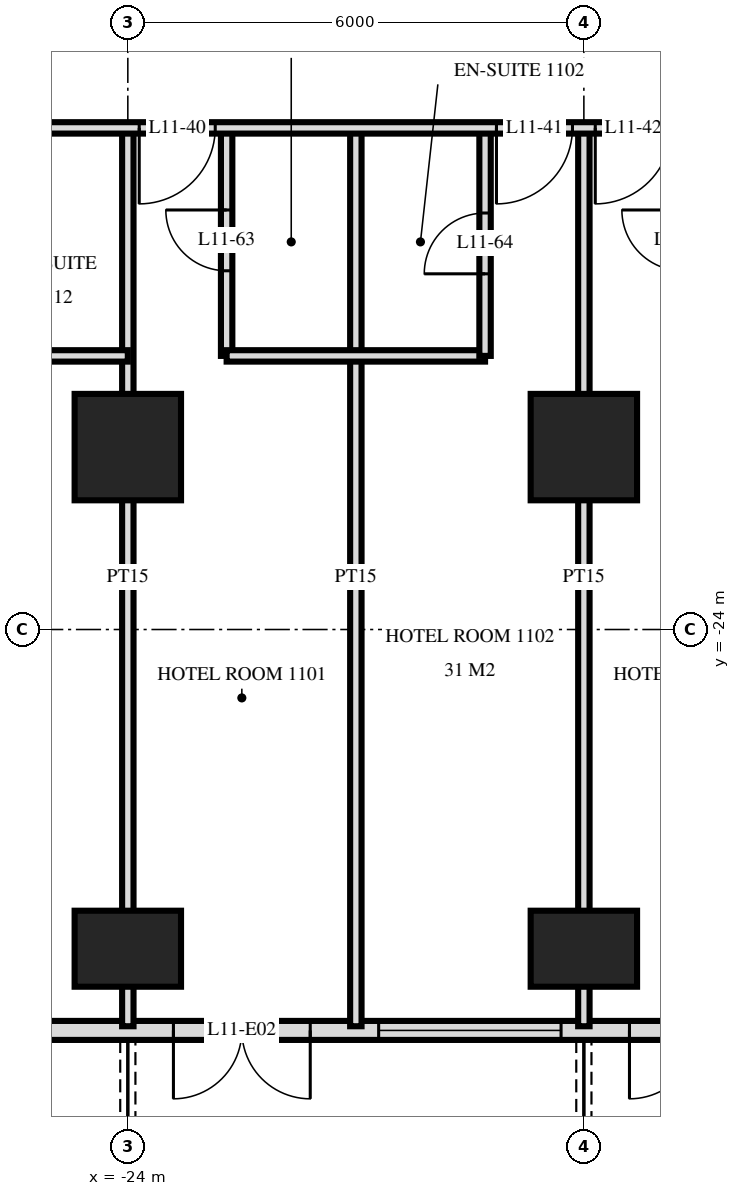
"""IFC4 building model, lengths in metres.
Left out: names, types, materials, properties, quantities, classifications, styles, units other than length and angle.
Written with IfcOpenShell. Run it as: python <this file> out.ifc"""

import sys

from ifc_helpers import new_model, si_unit, direction, frame, frame_2d, origin, origin_2d, place, context, subcontext, project, spatial, rectangle, extrude, element, fill, save


model = new_model("IFC4")
c1 = context("Model", 3, precision=1e-05, world=origin(), true_north=direction((0.0, 1.0)))
c2 = subcontext(c1, "Body", "Model", "MODEL_VIEW")
j1 = project(units=[si_unit("LENGTHUNIT", "METRE"), si_unit("PLANEANGLEUNIT", "RADIAN")], contexts=[c1])
p1 = place(None, origin())
s1 = spatial("IfcSite", under=j1, at=p1, CompositionType="ELEMENT")
p2 = place(p1, origin())
s2 = spatial("IfcBuilding", under=s1, at=p2, CompositionType="ELEMENT")
p3 = place(p2, frame((0.0, 0.0, 49.2)))
s3 = spatial("IfcBuildingStorey", under=s2, at=p3, CompositionType="ELEMENT", Elevation=49.2)
p4 = place(p3, frame((-24.0, -28.2, 0.0), z_axis=(0.0, 0.0, 1.0), x_axis=(1.0, 0.0, 0.0)))
e1 = element("IfcColumn", 1, at=p4, inside=s3, PredefinedType="COLUMN", context=c2, shape_type="SweptSolid", body=[
    extrude(rectangle(XDim=1.4, YDim=1.0, at=origin_2d()), origin(), (0.0, 0.0, 1.0), 3.6),
])
p5 = place(p3, frame((-24.0, -21.6, 0.0), z_axis=(0.0, 0.0, 1.0), x_axis=(1.0, 0.0, 0.0)))
e2 = element("IfcColumn", 2, at=p5, inside=s3, PredefinedType="COLUMN", context=c2, shape_type="SweptSolid", body=[
    extrude(rectangle(XDim=1.4, YDim=1.4, at=origin_2d()), origin(), (0.0, 0.0, 1.0), 3.6),
])
p6 = place(p3, frame((-18.0, -28.2, 0.0), z_axis=(0.0, 0.0, 1.0), x_axis=(1.0, 0.0, 0.0)))
e3 = element("IfcColumn", 3, at=p6, inside=s3, PredefinedType="COLUMN", context=c2, shape_type="SweptSolid", body=[
    extrude(rectangle(XDim=1.4, YDim=1.0, at=origin_2d()), origin(), (0.0, 0.0, 1.0), 3.6),
])
p7 = place(p3, frame((-18.0, -21.6, 0.0), z_axis=(0.0, 0.0, 1.0), x_axis=(1.0, 0.0, 0.0)))
e4 = element("IfcColumn", 4, at=p7, inside=s3, PredefinedType="COLUMN", context=c2, shape_type="SweptSolid", body=[
    extrude(rectangle(XDim=1.4, YDim=1.4, at=origin_2d()), origin(), (0.0, 0.0, 1.0), 3.6),
])
p8 = place(p3, frame((-28.775, -29.275, 0.0), z_axis=(0.0, 0.0, 1.0), x_axis=(1.0, 0.0, 0.0)))
e5 = element("IfcWall", 5, at=p8, inside=s3, PredefinedType="SOLIDWALL", context=c2, shape_type="SweptSolid", body=[
    extrude(rectangle(XDim=57.551, YDim=0.25, at=frame_2d((28.775, 0.0))), origin(), (0.0, 0.0, 1.0), 3.32),
])
p9 = place(p8, frame((0.575, 0.0, 0.0)))
e6 = element("IfcOpeningElement", 6, at=p9, cuts=e5, PredefinedType="OPENING", context=c2, shape_type="SweptSolid", body=[
    extrude(rectangle(XDim=1.8, YDim=2.4, at=frame_2d((0.9, 1.2))), frame((0.0, 0.135, 0.0), z_axis=(0.0, -1.0, 0.0), x_axis=(1.0, 0.0, 0.0)), (0.0, 0.0, 1.0), 0.27),
])
p10 = place(p8, frame((5.375, 0.0, 0.0)))
e7 = element("IfcOpeningElement", 7, at=p10, cuts=e5, PredefinedType="OPENING", context=c2, shape_type="SweptSolid", body=[
    extrude(rectangle(XDim=1.8, YDim=2.4, at=frame_2d((0.9, 1.2))), frame((0.0, 0.135, 0.0), z_axis=(0.0, -1.0, 0.0), x_axis=(1.0, 0.0, 0.0)), (0.0, 0.0, 1.0), 0.27),
])
p11 = place(p8, frame((8.075, 0.0, 0.3)))
e8 = element("IfcOpeningElement", 8, at=p11, cuts=e5, PredefinedType="OPENING", context=c2, shape_type="SweptSolid", body=[
    extrude(rectangle(XDim=2.4, YDim=2.1, at=frame_2d((1.2, 1.05))), frame((0.0, 0.135, 0.0), z_axis=(0.0, -1.0, 0.0), x_axis=(1.0, 0.0, 0.0)), (0.0, 0.0, 1.0), 0.27),
])
p12 = place(p8, frame((11.375, 0.0, 0.0)))
e9 = element("IfcOpeningElement", 9, at=p12, cuts=e5, PredefinedType="OPENING", context=c2, shape_type="SweptSolid", body=[
    extrude(rectangle(XDim=1.8, YDim=2.4, at=frame_2d((0.9, 1.2))), frame((0.0, 0.135, 0.0), z_axis=(0.0, -1.0, 0.0), x_axis=(1.0, 0.0, 0.0)), (0.0, 0.0, 1.0), 0.27),
])
p13 = place(p8, frame((14.075, 0.0, 0.3)))
e10 = element("IfcOpeningElement", 10, at=p13, cuts=e5, PredefinedType="OPENING", context=c2, shape_type="SweptSolid", body=[
    extrude(rectangle(XDim=2.4, YDim=2.1, at=frame_2d((1.2, 1.05))), frame((0.0, 0.135, 0.0), z_axis=(0.0, -1.0, 0.0), x_axis=(1.0, 0.0, 0.0)), (0.0, 0.0, 1.0), 0.27),
])
p14 = place(p8, frame((17.375, 0.0, 0.0)))
e11 = element("IfcOpeningElement", 11, at=p14, cuts=e5, PredefinedType="OPENING", context=c2, shape_type="SweptSolid", body=[
    extrude(rectangle(XDim=1.8, YDim=2.4, at=frame_2d((0.9, 1.2))), frame((0.0, 0.135, 0.0), z_axis=(0.0, -1.0, 0.0), x_axis=(1.0, 0.0, 0.0)), (0.0, 0.0, 1.0), 0.27),
])
p15 = place(p8, frame((20.075, 0.0, 0.3)))
e12 = element("IfcOpeningElement", 12, at=p15, cuts=e5, PredefinedType="OPENING", context=c2, shape_type="SweptSolid", body=[
    extrude(rectangle(XDim=2.4, YDim=2.1, at=frame_2d((1.2, 1.05))), frame((0.0, 0.135, 0.0), z_axis=(0.0, -1.0, 0.0), x_axis=(1.0, 0.0, 0.0)), (0.0, 0.0, 1.0), 0.27),
])
p16 = place(p8, frame((23.075, 0.0, 0.3)))
e13 = element("IfcOpeningElement", 13, at=p16, cuts=e5, PredefinedType="OPENING", context=c2, shape_type="SweptSolid", body=[
    extrude(rectangle(XDim=2.4, YDim=2.1, at=frame_2d((1.2, 1.05))), frame((0.0, 0.135, 0.0), z_axis=(0.0, -1.0, 0.0), x_axis=(1.0, 0.0, 0.0)), (0.0, 0.0, 1.0), 0.27),
])
p17 = place(p8, frame((26.375, 0.0, 0.0)))
e14 = element("IfcOpeningElement", 14, at=p17, cuts=e5, PredefinedType="OPENING", context=c2, shape_type="SweptSolid", body=[
    extrude(rectangle(XDim=1.8, YDim=2.4, at=frame_2d((0.9, 1.2))), frame((0.0, 0.135, 0.0), z_axis=(0.0, -1.0, 0.0), x_axis=(1.0, 0.0, 0.0)), (0.0, 0.0, 1.0), 0.27),
])
p18 = place(p8, frame((29.375, 0.0, 0.0)))
e15 = element("IfcOpeningElement", 15, at=p18, cuts=e5, PredefinedType="OPENING", context=c2, shape_type="SweptSolid", body=[
    extrude(rectangle(XDim=1.8, YDim=2.4, at=frame_2d((0.9, 1.2))), frame((0.0, 0.135, 0.0), z_axis=(0.0, -1.0, 0.0), x_axis=(1.0, 0.0, 0.0)), (0.0, 0.0, 1.0), 0.27),
])
p19 = place(p8, frame((32.075, 0.0, 0.3)))
e16 = element("IfcOpeningElement", 16, at=p19, cuts=e5, PredefinedType="OPENING", context=c2, shape_type="SweptSolid", body=[
    extrude(rectangle(XDim=2.4, YDim=2.1, at=frame_2d((1.2, 1.05))), frame((0.0, 0.135, 0.0), z_axis=(0.0, -1.0, 0.0), x_axis=(1.0, 0.0, 0.0)), (0.0, 0.0, 1.0), 0.27),
])
p20 = place(p8, frame((35.075, 0.0, 0.3)))
e17 = element("IfcOpeningElement", 17, at=p20, cuts=e5, PredefinedType="OPENING", context=c2, shape_type="SweptSolid", body=[
    extrude(rectangle(XDim=2.4, YDim=2.1, at=frame_2d((1.2, 1.05))), frame((0.0, 0.135, 0.0), z_axis=(0.0, -1.0, 0.0), x_axis=(1.0, 0.0, 0.0)), (0.0, 0.0, 1.0), 0.27),
])
p21 = place(p8, frame((38.375, 0.0, 0.0)))
e18 = element("IfcOpeningElement", 18, at=p21, cuts=e5, PredefinedType="OPENING", context=c2, shape_type="SweptSolid", body=[
    extrude(rectangle(XDim=1.8, YDim=2.4, at=frame_2d((0.9, 1.2))), frame((0.0, 0.135, 0.0), z_axis=(0.0, -1.0, 0.0), x_axis=(1.0, 0.0, 0.0)), (0.0, 0.0, 1.0), 0.27),
])
p22 = place(p8, frame((41.375, 0.0, 0.0)))
e19 = element("IfcOpeningElement", 19, at=p22, cuts=e5, PredefinedType="OPENING", context=c2, shape_type="SweptSolid", body=[
    extrude(rectangle(XDim=1.8, YDim=2.4, at=frame_2d((0.9, 1.2))), frame((0.0, 0.135, 0.0), z_axis=(0.0, -1.0, 0.0), x_axis=(1.0, 0.0, 0.0)), (0.0, 0.0, 1.0), 0.27),
])
p23 = place(p8, frame((44.075, 0.0, 0.3)))
e20 = element("IfcOpeningElement", 20, at=p23, cuts=e5, PredefinedType="OPENING", context=c2, shape_type="SweptSolid", body=[
    extrude(rectangle(XDim=2.4, YDim=2.1, at=frame_2d((1.2, 1.05))), frame((0.0, 0.135, 0.0), z_axis=(0.0, -1.0, 0.0), x_axis=(1.0, 0.0, 0.0)), (0.0, 0.0, 1.0), 0.27),
])
p24 = place(p8, frame((47.075, 0.0, 0.3)))
e21 = element("IfcOpeningElement", 21, at=p24, cuts=e5, PredefinedType="OPENING", context=c2, shape_type="SweptSolid", body=[
    extrude(rectangle(XDim=2.4, YDim=2.1, at=frame_2d((1.2, 1.05))), frame((0.0, 0.135, 0.0), z_axis=(0.0, -1.0, 0.0), x_axis=(1.0, 0.0, 0.0)), (0.0, 0.0, 1.0), 0.27),
])
p25 = place(p8, frame((50.375, 0.0, 0.0)))
e22 = element("IfcOpeningElement", 22, at=p25, cuts=e5, PredefinedType="OPENING", context=c2, shape_type="SweptSolid", body=[
    extrude(rectangle(XDim=1.8, YDim=2.4, at=frame_2d((0.9, 1.2))), frame((0.0, 0.135, 0.0), z_axis=(0.0, -1.0, 0.0), x_axis=(1.0, 0.0, 0.0)), (0.0, 0.0, 1.0), 0.27),
])
p26 = place(p8, frame((53.375, 0.0, 0.0)))
e23 = element("IfcOpeningElement", 23, at=p26, cuts=e5, PredefinedType="OPENING", context=c2, shape_type="SweptSolid", body=[
    extrude(rectangle(XDim=1.8, YDim=2.4, at=frame_2d((0.9, 1.2))), frame((0.0, 0.135, 0.0), z_axis=(0.0, -1.0, 0.0), x_axis=(1.0, 0.0, 0.0)), (0.0, 0.0, 1.0), 0.27),
])
p27 = place(p3, frame((-18.0, -29.22, 0.0), z_axis=(0.0, 0.0, 1.0), x_axis=(0.0, 1.0, 0.0)))
e24 = element("IfcWall", 24, at=p27, inside=s3, PredefinedType="PARTITIONING", context=c2, shape_type="SweptSolid", body=[
    extrude(rectangle(XDim=11.82, YDim=0.15, at=frame_2d((5.91, 0.0))), origin(), (0.0, 0.0, 1.0), 3.32),
])
p28 = place(p3, frame((-19.3, -20.4, 0.0), z_axis=(0.0, 0.0, 1.0), x_axis=(0.0, 1.0, 0.0)))
e25 = element("IfcWall", 25, at=p28, inside=s3, PredefinedType="PARTITIONING", context=c2, shape_type="SweptSolid", body=[
    extrude(rectangle(XDim=3.0, YDim=0.15, at=frame_2d((1.5, 0.0))), origin(), (0.0, 0.0, 1.0), 3.32),
])
p29 = place(p28, frame((1.08, 0.0, 0.0)))
e26 = element("IfcOpeningElement", 26, at=p29, cuts=e25, PredefinedType="OPENING", context=c2, shape_type="SweptSolid", body=[
    extrude(rectangle(XDim=0.8, YDim=2.1, at=frame_2d((0.4, 1.05))), frame((0.0, 0.085, 0.0), z_axis=(0.0, -1.0, 0.0), x_axis=(1.0, 0.0, 0.0)), (0.0, 0.0, 1.0), 0.17),
])
p30 = place(p3, frame((-21.0, -29.22, 0.0), z_axis=(0.0, 0.0, 1.0), x_axis=(0.0, 1.0, 0.0)))
e27 = element("IfcWall", 27, at=p30, inside=s3, PredefinedType="PARTITIONING", context=c2, shape_type="SweptSolid", body=[
    extrude(rectangle(XDim=11.82, YDim=0.15, at=frame_2d((5.91, 0.0))), origin(), (0.0, 0.0, 1.0), 3.32),
])
p31 = place(p3, frame((-22.7, -20.4, 0.0), z_axis=(0.0, 0.0, 1.0), x_axis=(0.0, 1.0, 0.0)))
e28 = element("IfcWall", 28, at=p31, inside=s3, PredefinedType="PARTITIONING", context=c2, shape_type="SweptSolid", body=[
    extrude(rectangle(XDim=3.0, YDim=0.15, at=frame_2d((1.5, 0.0))), origin(), (0.0, 0.0, 1.0), 3.32),
])
p32 = place(p31, frame((1.12, 0.0, 0.0)))
e29 = element("IfcOpeningElement", 29, at=p32, cuts=e28, PredefinedType="OPENING", context=c2, shape_type="SweptSolid", body=[
    extrude(rectangle(XDim=0.8, YDim=2.1, at=frame_2d((0.4, 1.05))), frame((0.0, 0.085, 0.0), z_axis=(0.0, -1.0, 0.0), x_axis=(1.0, 0.0, 0.0)), (0.0, 0.0, 1.0), 0.17),
])
p33 = place(p3, frame((-24.0, -29.22, 0.0), z_axis=(0.0, 0.0, 1.0), x_axis=(0.0, 1.0, 0.0)))
e30 = element("IfcWall", 30, at=p33, inside=s3, PredefinedType="PARTITIONING", context=c2, shape_type="SweptSolid", body=[
    extrude(rectangle(XDim=11.82, YDim=0.15, at=frame_2d((5.91, 0.0))), origin(), (0.0, 0.0, 1.0), 3.32),
])
p34 = place(p3, frame((-27.0, -20.4, 0.0), z_axis=(0.0, 0.0, 1.0), x_axis=(1.0, 0.0, 0.0)))
e31 = element("IfcWall", 31, at=p34, inside=s3, PredefinedType="PARTITIONING", context=c2, shape_type="SweptSolid", body=[
    extrude(rectangle(XDim=3.0, YDim=0.15, at=frame_2d((1.5, 0.0))), origin(), (0.0, 0.0, 1.0), 3.32),
])
p35 = place(p3, frame((-22.7, -20.4, 0.0), z_axis=(0.0, 0.0, 1.0), x_axis=(1.0, 0.0, 0.0)))
e32 = element("IfcWall", 32, at=p35, inside=s3, PredefinedType="PARTITIONING", context=c2, shape_type="SweptSolid", body=[
    extrude(rectangle(XDim=3.4, YDim=0.15, at=frame_2d((1.7, 0.0))), origin(), (0.0, 0.0, 1.0), 3.32),
])
p36 = place(p3, frame((-33.12, -17.4, 0.0), z_axis=(0.0, 0.0, 1.0), x_axis=(1.0, 0.0, 0.0)))
e33 = element("IfcWall", 33, at=p36, inside=s3, PredefinedType="PARTITIONING", context=c2, shape_type="SweptSolid", body=[
    extrude(rectangle(XDim=66.24, YDim=0.15, at=frame_2d((33.12, 0.0))), origin(), (0.0, 0.0, 1.0), 3.32),
])
p37 = place(p36, frame((9.27, 0.0, 0.0)))
e34 = element("IfcOpeningElement", 34, at=p37, cuts=e33, PredefinedType="OPENING", context=c2, shape_type="SweptSolid", body=[
    extrude(rectangle(XDim=1.0, YDim=2.1, at=frame_2d((0.5, 1.05))), frame((0.0, 0.085, 0.0), z_axis=(0.0, -1.0, 0.0), x_axis=(1.0, 0.0, 0.0)), (0.0, 0.0, 1.0), 0.17),
])
p38 = place(p36, frame((13.97, 0.0, 0.0)))
e35 = element("IfcOpeningElement", 35, at=p38, cuts=e33, PredefinedType="OPENING", context=c2, shape_type="SweptSolid", body=[
    extrude(rectangle(XDim=1.0, YDim=2.1, at=frame_2d((0.5, 1.05))), frame((0.0, 0.085, 0.0), z_axis=(0.0, -1.0, 0.0), x_axis=(1.0, 0.0, 0.0)), (0.0, 0.0, 1.0), 0.17),
])
p39 = place(p36, frame((15.27, 0.0, 0.0)))
e36 = element("IfcOpeningElement", 36, at=p39, cuts=e33, PredefinedType="OPENING", context=c2, shape_type="SweptSolid", body=[
    extrude(rectangle(XDim=1.0, YDim=2.1, at=frame_2d((0.5, 1.05))), frame((0.0, 0.085, 0.0), z_axis=(0.0, -1.0, 0.0), x_axis=(1.0, 0.0, 0.0)), (0.0, 0.0, 1.0), 0.17),
])
p40 = place(p36, frame((19.97, 0.0, 0.0)))
e37 = element("IfcOpeningElement", 37, at=p40, cuts=e33, PredefinedType="OPENING", context=c2, shape_type="SweptSolid", body=[
    extrude(rectangle(XDim=1.0, YDim=2.1, at=frame_2d((0.5, 1.05))), frame((0.0, 0.085, 0.0), z_axis=(0.0, -1.0, 0.0), x_axis=(1.0, 0.0, 0.0)), (0.0, 0.0, 1.0), 0.17),
])
p41 = place(p36, frame((22.27, 0.0, 0.0)))
e38 = element("IfcOpeningElement", 38, at=p41, cuts=e33, PredefinedType="OPENING", context=c2, shape_type="SweptSolid", body=[
    extrude(rectangle(XDim=1.0, YDim=2.1, at=frame_2d((0.5, 1.05))), frame((0.0, 0.085, 0.0), z_axis=(0.0, -1.0, 0.0), x_axis=(1.0, 0.0, 0.0)), (0.0, 0.0, 1.0), 0.17),
])
p42 = place(p36, frame((28.97, 0.0, 0.0)))
e39 = element("IfcOpeningElement", 39, at=p42, cuts=e33, PredefinedType="OPENING", context=c2, shape_type="SweptSolid", body=[
    extrude(rectangle(XDim=1.0, YDim=2.1, at=frame_2d((0.5, 1.05))), frame((0.0, 0.085, 0.0), z_axis=(0.0, -1.0, 0.0), x_axis=(1.0, 0.0, 0.0)), (0.0, 0.0, 1.0), 0.17),
])
p43 = place(p36, frame((30.27, 0.0, 0.0)))
e40 = element("IfcOpeningElement", 40, at=p43, cuts=e33, PredefinedType="OPENING", context=c2, shape_type="SweptSolid", body=[
    extrude(rectangle(XDim=1.0, YDim=2.1, at=frame_2d((0.5, 1.05))), frame((0.0, 0.085, 0.0), z_axis=(0.0, -1.0, 0.0), x_axis=(1.0, 0.0, 0.0)), (0.0, 0.0, 1.0), 0.17),
])
p44 = place(p36, frame((34.97, 0.0, 0.0)))
e41 = element("IfcOpeningElement", 41, at=p44, cuts=e33, PredefinedType="OPENING", context=c2, shape_type="SweptSolid", body=[
    extrude(rectangle(XDim=1.0, YDim=2.1, at=frame_2d((0.5, 1.05))), frame((0.0, 0.085, 0.0), z_axis=(0.0, -1.0, 0.0), x_axis=(1.0, 0.0, 0.0)), (0.0, 0.0, 1.0), 0.17),
])
p45 = place(p36, frame((36.27, 0.0, 0.0)))
e42 = element("IfcOpeningElement", 42, at=p45, cuts=e33, PredefinedType="OPENING", context=c2, shape_type="SweptSolid", body=[
    extrude(rectangle(XDim=1.0, YDim=2.1, at=frame_2d((0.5, 1.05))), frame((0.0, 0.085, 0.0), z_axis=(0.0, -1.0, 0.0), x_axis=(1.0, 0.0, 0.0)), (0.0, 0.0, 1.0), 0.17),
])
p46 = place(p36, frame((39.82, 0.0, 0.0)))
e43 = element("IfcOpeningElement", 43, at=p46, cuts=e33, PredefinedType="OPENING", context=c2, shape_type="SweptSolid", body=[
    extrude(rectangle(XDim=1.0, YDim=2.1, at=frame_2d((0.5, 1.05))), frame((0.0, 0.085, 0.0), z_axis=(0.0, -1.0, 0.0), x_axis=(1.0, 0.0, 0.0)), (0.0, 0.0, 1.0), 0.17),
])
p47 = place(p36, frame((51.27, 0.0, 0.0)))
e44 = element("IfcOpeningElement", 44, at=p47, cuts=e33, PredefinedType="OPENING", context=c2, shape_type="SweptSolid", body=[
    extrude(rectangle(XDim=1.0, YDim=2.1, at=frame_2d((0.5, 1.05))), frame((0.0, 0.085, 0.0), z_axis=(0.0, -1.0, 0.0), x_axis=(1.0, 0.0, 0.0)), (0.0, 0.0, 1.0), 0.17),
])
p48 = place(p36, frame((4.42, 0.0, 0.0)))
e45 = element("IfcOpeningElement", 45, at=p48, cuts=e33, PredefinedType="OPENING", context=c2, shape_type="SweptSolid", body=[
    extrude(rectangle(XDim=1.0, YDim=2.1, at=frame_2d((0.5, 1.05))), frame((0.0, 0.085, 0.0), z_axis=(0.0, -1.0, 0.0), x_axis=(1.0, 0.0, 0.0)), (0.0, 0.0, 1.0), 0.17),
])
p49 = place(p36, frame((54.82, 0.0, 0.0)))
e46 = element("IfcOpeningElement", 46, at=p49, cuts=e33, PredefinedType="OPENING", context=c2, shape_type="SweptSolid", body=[
    extrude(rectangle(XDim=1.0, YDim=2.1, at=frame_2d((0.5, 1.05))), frame((0.0, 0.085, 0.0), z_axis=(0.0, -1.0, 0.0), x_axis=(1.0, 0.0, 0.0)), (0.0, 0.0, 1.0), 0.17),
])
p50 = place(p10, frame((0.9, 0.0, 0.0), z_axis=(0.0, 0.0, 1.0), x_axis=(-1.0, 0.0, 0.0)))
e47 = element("IfcDoor", 47, at=p50, inside=s3, OperationType="DOUBLE_DOOR_SINGLE_SWING", PredefinedType="DOOR", context=c2, shape_type="SweptSolid", body=[
    extrude(rectangle(XDim=1.8, YDim=2.4, at=frame_2d((0.0, 1.2))), frame((0.0, -0.025, 0.0), z_axis=(0.0, 1.0, 0.0), x_axis=(-1.0, 0.0, 0.0)), (0.0, 0.0, 1.0), 0.05),
])
fill(e7, e47)
p51 = place(p11, origin())
e48 = element("IfcWindow", 48, at=p51, inside=s3, PartitioningType="SINGLE_PANEL", PredefinedType="WINDOW", context=c2, shape_type="SweptSolid", body=[
    extrude(rectangle(XDim=2.4, YDim=2.1, at=frame_2d((1.2, 1.05))), frame((0.0, 0.03, 0.0), z_axis=(0.0, -1.0, 0.0), x_axis=(1.0, 0.0, 0.0)), (0.0, 0.0, 1.0), 0.06),
])
fill(e8, e48)
p52 = place(p12, frame((0.9, 0.0, 0.0), z_axis=(0.0, 0.0, 1.0), x_axis=(-1.0, 0.0, 0.0)))
e49 = element("IfcDoor", 49, at=p52, inside=s3, OperationType="DOUBLE_DOOR_SINGLE_SWING", PredefinedType="DOOR", context=c2, shape_type="SweptSolid", body=[
    extrude(rectangle(XDim=1.8, YDim=2.4, at=frame_2d((0.0, 1.2))), frame((0.0, -0.025, 0.0), z_axis=(0.0, 1.0, 0.0), x_axis=(-1.0, 0.0, 0.0)), (0.0, 0.0, 1.0), 0.05),
])
fill(e9, e49)
p53 = place(p37, frame((0.5, 0.0, 0.0), z_axis=(0.0, 0.0, 1.0), x_axis=(-1.0, 0.0, 0.0)))
e50 = element("IfcDoor", 50, at=p53, inside=s3, OperationType="SINGLE_SWING_LEFT", PredefinedType="DOOR", context=c2, shape_type="SweptSolid", body=[
    extrude(rectangle(XDim=1.0, YDim=2.1, at=frame_2d((0.0, 1.05))), frame((0.0, -0.025, 0.0), z_axis=(0.0, 1.0, 0.0), x_axis=(-1.0, 0.0, 0.0)), (0.0, 0.0, 1.0), 0.05),
])
fill(e34, e50)
p54 = place(p38, frame((0.5, 0.0, 0.0), z_axis=(0.0, 0.0, 1.0), x_axis=(-1.0, 0.0, 0.0)))
e51 = element("IfcDoor", 51, at=p54, inside=s3, OperationType="SINGLE_SWING_LEFT", PredefinedType="DOOR", context=c2, shape_type="SweptSolid", body=[
    extrude(rectangle(XDim=1.0, YDim=2.1, at=frame_2d((0.0, 1.05))), frame((0.0, -0.025, 0.0), z_axis=(0.0, 1.0, 0.0), x_axis=(-1.0, 0.0, 0.0)), (0.0, 0.0, 1.0), 0.05),
])
fill(e35, e51)
p55 = place(p39, frame((0.5, 0.0, 0.0), z_axis=(0.0, 0.0, 1.0), x_axis=(-1.0, 0.0, 0.0)))
e52 = element("IfcDoor", 52, at=p55, inside=s3, OperationType="SINGLE_SWING_LEFT", PredefinedType="DOOR", context=c2, shape_type="SweptSolid", body=[
    extrude(rectangle(XDim=1.0, YDim=2.1, at=frame_2d((0.0, 1.05))), frame((0.0, -0.025, 0.0), z_axis=(0.0, 1.0, 0.0), x_axis=(-1.0, 0.0, 0.0)), (0.0, 0.0, 1.0), 0.05),
])
fill(e36, e52)
p56 = place(p32, origin())
e53 = element("IfcDoor", 53, at=p56, inside=s3, OperationType="SINGLE_SWING_LEFT", PredefinedType="DOOR", context=c2, shape_type="SweptSolid", body=[
    extrude(rectangle(XDim=0.8, YDim=2.1, at=frame_2d((0.4, 1.05))), frame((0.0, 0.025, 0.0), z_axis=(0.0, -1.0, 0.0), x_axis=(1.0, 0.0, 0.0)), (0.0, 0.0, 1.0), 0.05),
])
fill(e29, e53)
p57 = place(p29, origin())
e54 = element("IfcDoor", 54, at=p57, inside=s3, OperationType="SINGLE_SWING_RIGHT", PredefinedType="DOOR", context=c2, shape_type="SweptSolid", body=[
    extrude(rectangle(XDim=0.8, YDim=2.1, at=frame_2d((0.4, 1.05))), frame((0.0, 0.025, 0.0), z_axis=(0.0, -1.0, 0.0), x_axis=(1.0, 0.0, 0.0)), (0.0, 0.0, 1.0), 0.05),
])
fill(e26, e54)
save(model, sys.argv[1])
